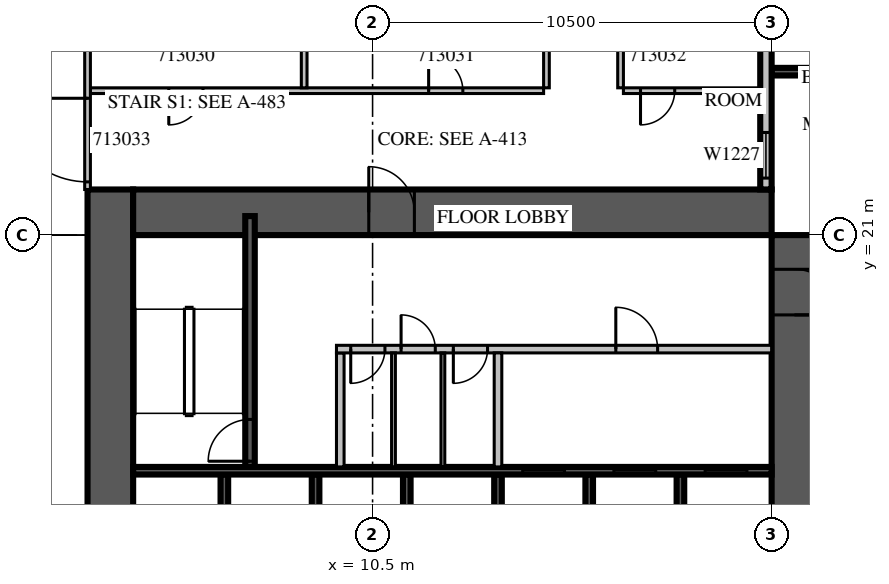
"""IFC4 building model, lengths in metres.
Left out: names, types, materials, properties, quantities, classifications, styles, units other than length and angle.
Written with IfcOpenShell. Run it as: python <this file> out.ifc"""

import sys

from ifc_helpers import new_model, si_unit, direction, frame, frame_2d, origin, place, context, subcontext, project, spatial, rectangle, extrude, source, transform, mapped, element, fill, save


model = new_model("IFC4")
c1 = context("Model", 3, precision=1e-05, world=origin(), true_north=direction((0.0, 1.0)))
c2 = subcontext(c1, "Body", "Model", "MODEL_VIEW")
j1 = project(units=[si_unit("LENGTHUNIT", "METRE"), si_unit("PLANEANGLEUNIT", "RADIAN")], contexts=[c1])
p1 = place(None, origin())
s1 = spatial("IfcSite", under=j1, at=p1, CompositionType="ELEMENT")
p2 = place(p1, origin())
s2 = spatial("IfcBuilding", under=s1, at=p2, CompositionType="ELEMENT")
p3 = place(p2, frame((0.0, 0.0, 65.7)))
s3 = spatial("IfcBuildingStorey", under=s2, at=p3, CompositionType="ELEMENT", Elevation=65.7)
m1 = source(origin(), c2, "Body", "SweptSolid", [
    extrude(rectangle(XDim=18.0, YDim=1.2, at=frame_2d((9.0, 0.0))), origin(), (0.0, 0.0, 1.0), 4.2),
])
p4 = place(p3, frame((3.6, 4.2, 0.0), z_axis=(0.0, 0.0, 1.0), x_axis=(0.0, 1.0, 0.0)))
e1 = element("IfcWall", 1, at=p4, inside=s3, PredefinedType="SHEAR", context=c2, shape_type="MappedRepresentation", body=[
    mapped(m1, transform((0.0, 0.0, 0.0), scale=1.0)),
])
m2 = source(origin(), c2, "Body", "SweptSolid", [
    extrude(rectangle(XDim=2.2, YDim=2.1, at=frame_2d((1.1, 1.05))), frame((0.0, 0.61, 0.0), z_axis=(0.0, -1.0, 0.0), x_axis=(1.0, 0.0, 0.0)), (0.0, 0.0, 1.0), 1.22),
])
p5 = place(p4, frame((4.2, 0.0, 0.0)))
e2 = element("IfcOpeningElement", 2, at=p5, cuts=e1, PredefinedType="OPENING", context=c2, shape_type="MappedRepresentation", body=[
    mapped(m2, transform((0.0, 0.0, 0.0), scale=1.0)),
])
m3 = source(origin(), c2, "Body", "SweptSolid", [
    extrude(rectangle(XDim=16.8, YDim=1.2, at=frame_2d((8.4, 0.0))), origin(), (0.0, 0.0, 1.0), 4.2),
])
p6 = place(p3, frame((21.6, 4.2, 0.0), z_axis=(0.0, 0.0, 1.0), x_axis=(0.0, 1.0, 0.0)))
e3 = element("IfcWall", 3, at=p6, inside=s3, PredefinedType="SHEAR", context=c2, shape_type="MappedRepresentation", body=[
    mapped(m3, transform((0.0, 0.0, 0.0), scale=1.0)),
])
p7 = place(p6, frame((4.2, 0.0, 0.0)))
e4 = element("IfcOpeningElement", 4, at=p7, cuts=e3, PredefinedType="OPENING", context=c2, shape_type="MappedRepresentation", body=[
    mapped(m2, transform((0.0, 0.0, 0.0), scale=1.0)),
])
m4 = source(origin(), c2, "Body", "SweptSolid", [
    extrude(rectangle(XDim=1.2, YDim=2.1, at=frame_2d((0.6, 1.05))), frame((0.0, 0.61, 0.0), z_axis=(0.0, -1.0, 0.0), x_axis=(1.0, 0.0, 0.0)), (0.0, 0.0, 1.0), 1.22),
])
p8 = place(p6, frame((14.7, 0.0, 0.0)))
e5 = element("IfcOpeningElement", 5, at=p8, cuts=e3, PredefinedType="OPENING", context=c2, shape_type="MappedRepresentation", body=[
    mapped(m4, transform((0.0, 0.0, 0.0), scale=1.0)),
])
p9 = place(p3, frame((4.2, 21.6, 0.0), z_axis=(0.0, 0.0, 1.0), x_axis=(1.0, 0.0, 0.0)))
e6 = element("IfcWall", 6, at=p9, inside=s3, PredefinedType="SHEAR", context=c2, shape_type="MappedRepresentation", body=[
    mapped(m3, transform((0.0, 0.0, 0.0), scale=1.0)),
])
p10 = place(p9, frame((6.2, 0.0, 0.0)))
e7 = element("IfcOpeningElement", 7, at=p10, cuts=e6, PredefinedType="OPENING", context=c2, shape_type="MappedRepresentation", body=[
    mapped(m4, transform((0.0, 0.0, 0.0), scale=1.0)),
])
m5 = source(origin(), c2, "Body", "SweptSolid", [
    extrude(rectangle(XDim=3.9, YDim=0.2, at=frame_2d((1.95, 0.0))), origin(), (0.0, 0.0, 1.0), 3.8),
])
p11 = place(p3, frame((21.0, 25.3, 0.0), z_axis=(0.0, 0.0, 1.0), x_axis=(1.0, 0.0, 0.0)))
e8 = element("IfcWall", 8, at=p11, inside=s3, PredefinedType="SOLIDWALL", context=c2, shape_type="MappedRepresentation", body=[
    mapped(m5, transform((0.0, 0.0, 0.0), scale=1.0)),
])
m6 = source(origin(), c2, "Body", "SweptSolid", [
    extrude(rectangle(XDim=2.4, YDim=2.7, at=frame_2d((1.2, 1.35))), frame((0.0, 0.11, 0.0), z_axis=(0.0, -1.0, 0.0), x_axis=(1.0, 0.0, 0.0)), (0.0, 0.0, 1.0), 0.22),
])
p12 = place(p11, frame((0.75, 0.0, 0.6)))
e9 = element("IfcOpeningElement", 9, at=p12, cuts=e8, PredefinedType="OPENING", context=c2, shape_type="MappedRepresentation", body=[
    mapped(m6, transform((0.0, 0.0, 0.0), scale=1.0)),
])
m7 = source(origin(), c2, "Body", "SweptSolid", [
    extrude(rectangle(XDim=6.6, YDim=0.3, at=frame_2d((3.3, 0.0))), origin(), (0.0, 0.0, 1.0), 3.8),
])
p13 = place(p3, frame((20.85, 22.2, 0.0), z_axis=(0.0, 0.0, 1.0), x_axis=(0.0, 1.0, 0.0)))
e10 = element("IfcWall", 10, at=p13, inside=s3, PredefinedType="STANDARD", context=c2, shape_type="MappedRepresentation", body=[
    mapped(m7, transform((0.0, 0.0, 0.0), scale=1.0)),
])
m8 = source(origin(), c2, "Body", "SweptSolid", [
    extrude(rectangle(XDim=1.2, YDim=2.7, at=frame_2d((0.6, 1.35))), frame((0.0, 0.16, 0.0), z_axis=(0.0, -1.0, 0.0), x_axis=(1.0, 0.0, 0.0)), (0.0, 0.0, 1.0), 0.32),
])
p14 = place(p13, frame((0.3, 0.0, 0.6)))
e11 = element("IfcOpeningElement", 11, at=p14, cuts=e10, PredefinedType="OPENING", context=c2, shape_type="MappedRepresentation", body=[
    mapped(m8, transform((0.0, 0.0, 0.0), scale=1.0)),
])
m9 = source(origin(), c2, "Body", "SweptSolid", [
    extrude(rectangle(XDim=1.0, YDim=2.1, at=frame_2d((0.5, 1.05))), frame((0.0, 0.16, 0.0), z_axis=(0.0, -1.0, 0.0), x_axis=(1.0, 0.0, 0.0)), (0.0, 0.0, 1.0), 0.32),
])
p15 = place(p13, frame((4.6, 0.0, 0.0)))
e12 = element("IfcOpeningElement", 12, at=p15, cuts=e10, PredefinedType="OPENING", context=c2, shape_type="MappedRepresentation", body=[
    mapped(m9, transform((0.0, 0.0, 0.0), scale=1.0)),
])
m10 = source(origin(), c2, "Body", "SweptSolid", [
    extrude(rectangle(XDim=3.0, YDim=0.2, at=frame_2d((1.5, 0.0))), origin(), (0.0, 0.0, 1.0), 4.2),
])
for number, where, z_axis, x_axis in (
    (13, (6.6, 11.7, 0.0), (0.0, 0.0, 1.0), (0.0, 1.0, 0.0)),
    (14, (9.0, 11.7, 0.0), (0.0, 0.0, 1.0), (0.0, 1.0, 0.0)),
    (15, (11.4, 11.7, 0.0), (0.0, 0.0, 1.0), (0.0, 1.0, 0.0)),
    (16, (13.8, 11.7, 0.0), (0.0, 0.0, 1.0), (0.0, 1.0, 0.0)),
    (17, (16.2, 11.7, 0.0), (0.0, 0.0, 1.0), (0.0, 1.0, 0.0)),
    (18, (18.6, 11.7, 0.0), (0.0, 0.0, 1.0), (0.0, 1.0, 0.0)),
):
    element("IfcWall", number, at=place(p3, frame(where, z_axis=z_axis, x_axis=x_axis)), inside=s3, PredefinedType="SOLIDWALL", context=c2, shape_type="MappedRepresentation", body=[
        mapped(m10, transform((0.0, 0.0, 0.0), scale=1.0)),
    ])
m11 = source(origin(), c2, "Body", "SweptSolid", [
    extrude(rectangle(XDim=16.8, YDim=0.2, at=frame_2d((8.4, 0.0))), origin(), (0.0, 0.0, 1.0), 4.2),
])
p16 = place(p3, frame((4.2, 14.8, 0.0), z_axis=(0.0, 0.0, 1.0), x_axis=(1.0, 0.0, 0.0)))
e19 = element("IfcWall", 19, at=p16, inside=s3, PredefinedType="SOLIDWALL", context=c2, shape_type="MappedRepresentation", body=[
    mapped(m11, transform((0.0, 0.0, 0.0), scale=1.0)),
])
m12 = source(origin(), c2, "Body", "SweptSolid", [
    extrude(rectangle(XDim=1.1, YDim=2.1, at=frame_2d((0.55, 1.05))), frame((0.0, 0.11, 0.0), z_axis=(0.0, -1.0, 0.0), x_axis=(1.0, 0.0, 0.0)), (0.0, 0.0, 1.0), 0.22),
])
p17 = place(p16, frame((10.25, 0.0, 0.0)))
e20 = element("IfcOpeningElement", 20, at=p17, cuts=e19, PredefinedType="OPENING", context=c2, shape_type="MappedRepresentation", body=[
    mapped(m12, transform((0.0, 0.0, 0.0), scale=1.0)),
])
p18 = place(p16, frame((12.65, 0.0, 0.0)))
e21 = element("IfcOpeningElement", 21, at=p18, cuts=e19, PredefinedType="OPENING", context=c2, shape_type="MappedRepresentation", body=[
    mapped(m12, transform((0.0, 0.0, 0.0), scale=1.0)),
])
p19 = place(p16, frame((15.05, 0.0, 0.0)))
e22 = element("IfcOpeningElement", 22, at=p19, cuts=e19, PredefinedType="OPENING", context=c2, shape_type="MappedRepresentation", body=[
    mapped(m12, transform((0.0, 0.0, 0.0), scale=1.0)),
])
m13 = source(origin(), c2, "Body", "SweptSolid", [
    extrude(rectangle(XDim=6.6, YDim=0.25, at=frame_2d((3.3, 0.0))), origin(), (0.0, 0.0, 1.0), 3.8),
])
p20 = place(p3, frame((7.275, 14.9, 0.0), z_axis=(0.0, 0.0, 1.0), x_axis=(0.0, 1.0, 0.0)))
e23 = element("IfcWall", 23, at=p20, inside=s3, PredefinedType="SOLIDWALL", context=c2, shape_type="MappedRepresentation", body=[
    mapped(m13, transform((0.0, 0.0, 0.0), scale=1.0)),
])
m14 = source(origin(), c2, "Body", "SweptSolid", [
    extrude(rectangle(XDim=1.1, YDim=2.1, at=frame_2d((0.55, 1.05))), frame((0.0, 0.135, 0.0), z_axis=(0.0, -1.0, 0.0), x_axis=(1.0, 0.0, 0.0)), (0.0, 0.0, 1.0), 0.27),
])
p21 = place(p20, frame((0.15, 0.0, 0.0)))
e24 = element("IfcOpeningElement", 24, at=p21, cuts=e23, PredefinedType="OPENING", context=c2, shape_type="MappedRepresentation", body=[
    mapped(m14, transform((0.0, 0.0, 0.0), scale=1.0)),
])
m15 = source(origin(), c2, "Body", "SweptSolid", [
    extrude(rectangle(XDim=3.0, YDim=0.2, at=frame_2d((1.5, 0.0))), origin(), (0.0, 0.0, 1.0), 3.8),
])
p22 = place(p3, frame((9.65, 14.9, 0.0), z_axis=(0.0, 0.0, 1.0), x_axis=(0.0, 1.0, 0.0)))
e25 = element("IfcWall", 25, at=p22, inside=s3, PredefinedType="PARTITIONING", context=c2, shape_type="MappedRepresentation", body=[
    mapped(m15, transform((0.0, 0.0, 0.0), scale=1.0)),
])
m16 = source(origin(), c2, "Body", "SweptSolid", [
    extrude(rectangle(XDim=11.45, YDim=0.2, at=frame_2d((5.725, 0.0))), origin(), (0.0, 0.0, 1.0), 3.8),
])
p23 = place(p3, frame((9.55, 18.0, 0.0), z_axis=(0.0, 0.0, 1.0), x_axis=(1.0, 0.0, 0.0)))
e26 = element("IfcWall", 26, at=p23, inside=s3, PredefinedType="PARTITIONING", context=c2, shape_type="MappedRepresentation", body=[
    mapped(m16, transform((0.0, 0.0, 0.0), scale=1.0)),
])
m17 = source(origin(), c2, "Body", "SweptSolid", [
    extrude(rectangle(XDim=0.9, YDim=2.1, at=frame_2d((0.45, 1.05))), frame((0.0, 0.11, 0.0), z_axis=(0.0, -1.0, 0.0), x_axis=(1.0, 0.0, 0.0)), (0.0, 0.0, 1.0), 0.22),
])
p24 = place(p23, frame((0.375, 0.0, 0.0)))
e27 = element("IfcOpeningElement", 27, at=p24, cuts=e26, PredefinedType="OPENING", context=c2, shape_type="MappedRepresentation", body=[
    mapped(m17, transform((0.0, 0.0, 0.0), scale=1.0)),
])
p25 = place(p23, frame((1.7, 0.0, 0.0)))
e28 = element("IfcOpeningElement", 28, at=p25, cuts=e26, PredefinedType="OPENING", context=c2, shape_type="MappedRepresentation", body=[
    mapped(m17, transform((0.0, 0.0, 0.0), scale=1.0)),
])
p26 = place(p23, frame((3.075, 0.0, 0.0)))
e29 = element("IfcOpeningElement", 29, at=p26, cuts=e26, PredefinedType="OPENING", context=c2, shape_type="MappedRepresentation", body=[
    mapped(m17, transform((0.0, 0.0, 0.0), scale=1.0)),
])
p27 = place(p23, frame((7.35, 0.0, 0.0)))
e30 = element("IfcOpeningElement", 30, at=p27, cuts=e26, PredefinedType="OPENING", context=c2, shape_type="MappedRepresentation", body=[
    mapped(m12, transform((0.0, 0.0, 0.0), scale=1.0)),
])
p28 = place(p3, frame((13.8, 14.9, 0.0), z_axis=(0.0, 0.0, 1.0), x_axis=(0.0, 1.0, 0.0)))
e31 = element("IfcWall", 31, at=p28, inside=s3, PredefinedType="PARTITIONING", context=c2, shape_type="MappedRepresentation", body=[
    mapped(m15, transform((0.0, 0.0, 0.0), scale=1.0)),
])
m18 = source(origin(), c2, "Body", "SweptSolid", [
    extrude(rectangle(XDim=3.0, YDim=0.1, at=frame_2d((1.5, 0.0))), origin(), (0.0, 0.0, 1.0), 3.8),
])
for number, where, z_axis, x_axis in (
    (32, (11.05, 14.9, 0.0), (0.0, 0.0, 1.0), (0.0, 1.0, 0.0)),
    (33, (12.35, 14.9, 0.0), (0.0, 0.0, 1.0), (0.0, 1.0, 0.0)),
):
    element("IfcWall", number, at=place(p3, frame(where, z_axis=z_axis, x_axis=x_axis)), inside=s3, PredefinedType="PARTITIONING", context=c2, shape_type="MappedRepresentation", body=[
        mapped(m18, transform((0.0, 0.0, 0.0), scale=1.0)),
    ])
m19 = source(origin(), c2, "Body", "SweptSolid", [
    extrude(rectangle(XDim=11.925, YDim=0.15, at=frame_2d((5.963, 0.0))), origin(), (0.0, 0.0, 1.0), 3.8),
])
p29 = place(p3, frame((3.075, 24.8, 0.0), z_axis=(0.0, 0.0, 1.0), x_axis=(1.0, 0.0, 0.0)))
e34 = element("IfcWall", 34, at=p29, inside=s3, PredefinedType="PARTITIONING", context=c2, shape_type="MappedRepresentation", body=[
    mapped(m19, transform((0.0, 0.0, 0.0), scale=1.0)),
])
m20 = source(origin(), c2, "Body", "SweptSolid", [
    extrude(rectangle(XDim=0.9, YDim=2.1, at=frame_2d((0.45, 1.05))), frame((0.0, 0.085, 0.0), z_axis=(0.0, -1.0, 0.0), x_axis=(1.0, 0.0, 0.0)), (0.0, 0.0, 1.0), 0.17),
])
p30 = place(p29, frame((2.062, 0.0, 0.0)))
e35 = element("IfcOpeningElement", 35, at=p30, cuts=e34, PredefinedType="OPENING", context=c2, shape_type="MappedRepresentation", body=[
    mapped(m20, transform((0.0, 0.0, 0.0), scale=1.0)),
])
p31 = place(p29, frame((8.9, 0.0, 0.0)))
e36 = element("IfcOpeningElement", 36, at=p31, cuts=e34, PredefinedType="OPENING", context=c2, shape_type="MappedRepresentation", body=[
    mapped(m20, transform((0.0, 0.0, 0.0), scale=1.0)),
])
m21 = source(origin(), c2, "Body", "SweptSolid", [
    extrude(rectangle(XDim=3.6, YDim=0.15, at=frame_2d((1.8, 0.0))), origin(), (0.0, 0.0, 1.0), 3.8),
])
p32 = place(p3, frame((17.1, 24.8, 0.0), z_axis=(0.0, 0.0, 1.0), x_axis=(1.0, 0.0, 0.0)))
e37 = element("IfcWall", 37, at=p32, inside=s3, PredefinedType="PARTITIONING", context=c2, shape_type="MappedRepresentation", body=[
    mapped(m21, transform((0.0, 0.0, 0.0), scale=1.0)),
])
p33 = place(p32, frame((0.45, 0.0, 0.0)))
e38 = element("IfcOpeningElement", 38, at=p33, cuts=e37, PredefinedType="OPENING", context=c2, shape_type="MappedRepresentation", body=[
    mapped(m20, transform((0.0, 0.0, 0.0), scale=1.0)),
])
m22 = source(origin(), c2, "Body", "SweptSolid", [
    extrude(rectangle(XDim=4.45, YDim=0.15, at=frame_2d((2.225, 0.0))), origin(), (0.0, 0.0, 1.0), 3.8),
])
for number, where, z_axis, x_axis in (
    (39, (8.7, 24.875, 0.0), (0.0, 0.0, 1.0), (0.0, 1.0, 0.0)),
    (40, (15.075, 24.875, 0.0), (0.0, 0.0, 1.0), (0.0, 1.0, 0.0)),
    (41, (17.025, 29.325, 0.0), (0.0, 0.0, 1.0), (0.0, -1.0, 0.0)),
):
    element("IfcWall", number, at=place(p3, frame(where, z_axis=z_axis, x_axis=x_axis)), inside=s3, PredefinedType="PARTITIONING", context=c2, shape_type="MappedRepresentation", body=[
        mapped(m22, transform((0.0, 0.0, 0.0), scale=1.0)),
    ])
m23 = source(origin(), c2, "Body", "SweptSolid", [
    extrude(rectangle(XDim=7.125, YDim=0.15, at=frame_2d((3.562, 0.0))), origin(), (0.0, 0.0, 1.0), 3.8),
])
p34 = place(p3, frame((3.0, 29.325, 0.0), z_axis=(0.0, 0.0, 1.0), x_axis=(0.0, -1.0, 0.0)))
e42 = element("IfcWall", 42, at=p34, inside=s3, PredefinedType="PARTITIONING", context=c2, shape_type="MappedRepresentation", body=[
    mapped(m23, transform((0.0, 0.0, 0.0), scale=1.0)),
])
p35 = place(p34, frame((4.725, 0.0, 0.0)))
e43 = element("IfcOpeningElement", 43, at=p35, cuts=e42, PredefinedType="OPENING", context=c2, shape_type="SweptSolid", body=[
    extrude(rectangle(XDim=2.2, YDim=2.1, at=frame_2d((1.1, 1.05))), frame((0.0, 0.085, 0.0), z_axis=(0.0, -1.0, 0.0), x_axis=(1.0, 0.0, 0.0)), (0.0, 0.0, 1.0), 0.17),
])
m24 = source(origin(), c2, "Body", "SweptSolid", [
    extrude(rectangle(XDim=2.4, YDim=2.7, at=frame_2d((1.2, 1.35))), frame((0.0, 0.03, 0.0), z_axis=(0.0, -1.0, 0.0), x_axis=(1.0, 0.0, 0.0)), (0.0, 0.0, 1.0), 0.06),
])
p36 = place(p12, origin())
e44 = element("IfcWindow", 44, at=p36, inside=s3, PartitioningType="SINGLE_PANEL", PredefinedType="WINDOW", context=c2, shape_type="MappedRepresentation", body=[
    mapped(m24, transform((0.0, 0.0, 0.0), scale=1.0)),
])
fill(e9, e44)
m25 = source(origin(), c2, "Body", "SweptSolid", [
    extrude(rectangle(XDim=1.2, YDim=2.7, at=frame_2d((0.6, 1.35))), frame((0.0, 0.03, 0.0), z_axis=(0.0, -1.0, 0.0), x_axis=(1.0, 0.0, 0.0)), (0.0, 0.0, 1.0), 0.06),
])
p37 = place(p14, origin())
e45 = element("IfcWindow", 45, at=p37, inside=s3, PartitioningType="SINGLE_PANEL", PredefinedType="WINDOW", context=c2, shape_type="MappedRepresentation", body=[
    mapped(m25, transform((0.0, 0.0, 0.0), scale=1.0)),
])
fill(e11, e45)
m26 = source(origin(), c2, "Body", "SweptSolid", [
    extrude(rectangle(XDim=1.1, YDim=2.1, at=frame_2d((0.55, 1.05))), frame((0.0, 0.025, 0.0), z_axis=(0.0, -1.0, 0.0), x_axis=(1.0, 0.0, 0.0)), (0.0, 0.0, 1.0), 0.05),
])
p38 = place(p17, origin())
e46 = element("IfcDoor", 46, at=p38, inside=s3, OperationType="SLIDING_TO_LEFT", PredefinedType="DOOR", context=c2, shape_type="MappedRepresentation", body=[
    mapped(m26, transform((0.0, 0.0, 0.0), scale=1.0)),
])
fill(e20, e46)
p39 = place(p18, origin())
e47 = element("IfcDoor", 47, at=p39, inside=s3, OperationType="SLIDING_TO_LEFT", PredefinedType="DOOR", context=c2, shape_type="MappedRepresentation", body=[
    mapped(m26, transform((0.0, 0.0, 0.0), scale=1.0)),
])
fill(e21, e47)
p40 = place(p19, origin())
e48 = element("IfcDoor", 48, at=p40, inside=s3, OperationType="SLIDING_TO_LEFT", PredefinedType="DOOR", context=c2, shape_type="MappedRepresentation", body=[
    mapped(m26, transform((0.0, 0.0, 0.0), scale=1.0)),
])
fill(e22, e48)
p41 = place(p21, origin())
e49 = element("IfcDoor", 49, at=p41, inside=s3, OperationType="SINGLE_SWING_LEFT", PredefinedType="DOOR", context=c2, shape_type="MappedRepresentation", body=[
    mapped(m26, transform((0.0, 0.0, 0.0), scale=1.0)),
])
fill(e24, e49)
m27 = source(origin(), c2, "Body", "SweptSolid", [
    extrude(rectangle(XDim=0.9, YDim=2.1, at=frame_2d((0.45, 1.05))), frame((0.0, 0.025, 0.0), z_axis=(0.0, -1.0, 0.0), x_axis=(1.0, 0.0, 0.0)), (0.0, 0.0, 1.0), 0.05),
])
p42 = place(p24, origin())
e50 = element("IfcDoor", 50, at=p42, inside=s3, OperationType="SINGLE_SWING_RIGHT", PredefinedType="DOOR", context=c2, shape_type="MappedRepresentation", body=[
    mapped(m27, transform((0.0, 0.0, 0.0), scale=1.0)),
])
fill(e27, e50)
p43 = place(p25, origin())
e51 = element("IfcDoor", 51, at=p43, inside=s3, OperationType="SINGLE_SWING_LEFT", PredefinedType="DOOR", context=c2, shape_type="MappedRepresentation", body=[
    mapped(m27, transform((0.0, 0.0, 0.0), scale=1.0)),
])
fill(e28, e51)
p44 = place(p26, origin())
e52 = element("IfcDoor", 52, at=p44, inside=s3, OperationType="SINGLE_SWING_RIGHT", PredefinedType="DOOR", context=c2, shape_type="MappedRepresentation", body=[
    mapped(m27, transform((0.0, 0.0, 0.0), scale=1.0)),
])
fill(e29, e52)
p45 = place(p27, origin())
e53 = element("IfcDoor", 53, at=p45, inside=s3, OperationType="SINGLE_SWING_LEFT", PredefinedType="DOOR", context=c2, shape_type="MappedRepresentation", body=[
    mapped(m26, transform((0.0, 0.0, 0.0), scale=1.0)),
])
fill(e30, e53)
m28 = source(origin(), c2, "Body", "SweptSolid", [
    extrude(rectangle(XDim=1.2, YDim=2.1, at=frame_2d((0.6, 1.05))), frame((0.0, 0.025, 0.0), z_axis=(0.0, -1.0, 0.0), x_axis=(1.0, 0.0, 0.0)), (0.0, 0.0, 1.0), 0.05),
])
p46 = place(p10, origin())
e54 = element("IfcDoor", 54, at=p46, inside=s3, OperationType="SINGLE_SWING_LEFT", PredefinedType="DOOR", context=c2, shape_type="MappedRepresentation", body=[
    mapped(m28, transform((0.0, 0.0, 0.0), scale=1.0)),
])
fill(e7, e54)
p47 = place(p8, origin())
e55 = element("IfcDoor", 55, at=p47, inside=s3, OperationType="SINGLE_SWING_RIGHT", PredefinedType="DOOR", context=c2, shape_type="MappedRepresentation", body=[
    mapped(m28, transform((0.0, 0.0, 0.0), scale=1.0)),
])
fill(e5, e55)
p48 = place(p30, origin())
e56 = element("IfcDoor", 56, at=p48, inside=s3, OperationType="SINGLE_SWING_RIGHT", PredefinedType="DOOR", context=c2, shape_type="MappedRepresentation", body=[
    mapped(m27, transform((0.0, 0.0, 0.0), scale=1.0)),
])
fill(e35, e56)
p49 = place(p31, origin())
e57 = element("IfcDoor", 57, at=p49, inside=s3, OperationType="SINGLE_SWING_LEFT", PredefinedType="DOOR", context=c2, shape_type="MappedRepresentation", body=[
    mapped(m27, transform((0.0, 0.0, 0.0), scale=1.0)),
])
fill(e36, e57)
p50 = place(p33, origin())
e58 = element("IfcDoor", 58, at=p50, inside=s3, OperationType="SINGLE_SWING_RIGHT", PredefinedType="DOOR", context=c2, shape_type="MappedRepresentation", body=[
    mapped(m27, transform((0.0, 0.0, 0.0), scale=1.0)),
])
fill(e38, e58)
m29 = source(origin(), c2, "Body", "SweptSolid", [
    extrude(rectangle(XDim=2.2, YDim=2.1, at=frame_2d((1.1, 1.05))), frame((0.0, 0.025, 0.0), z_axis=(0.0, -1.0, 0.0), x_axis=(1.0, 0.0, 0.0)), (0.0, 0.0, 1.0), 0.05),
])
p51 = place(p35, origin())
e59 = element("IfcDoor", 59, at=p51, inside=s3, OperationType="DOUBLE_DOOR_SINGLE_SWING", PredefinedType="DOOR", context=c2, shape_type="MappedRepresentation", body=[
    mapped(m29, transform((0.0, 0.0, 0.0), scale=1.0)),
])
fill(e43, e59)
save(model, sys.argv[1])
